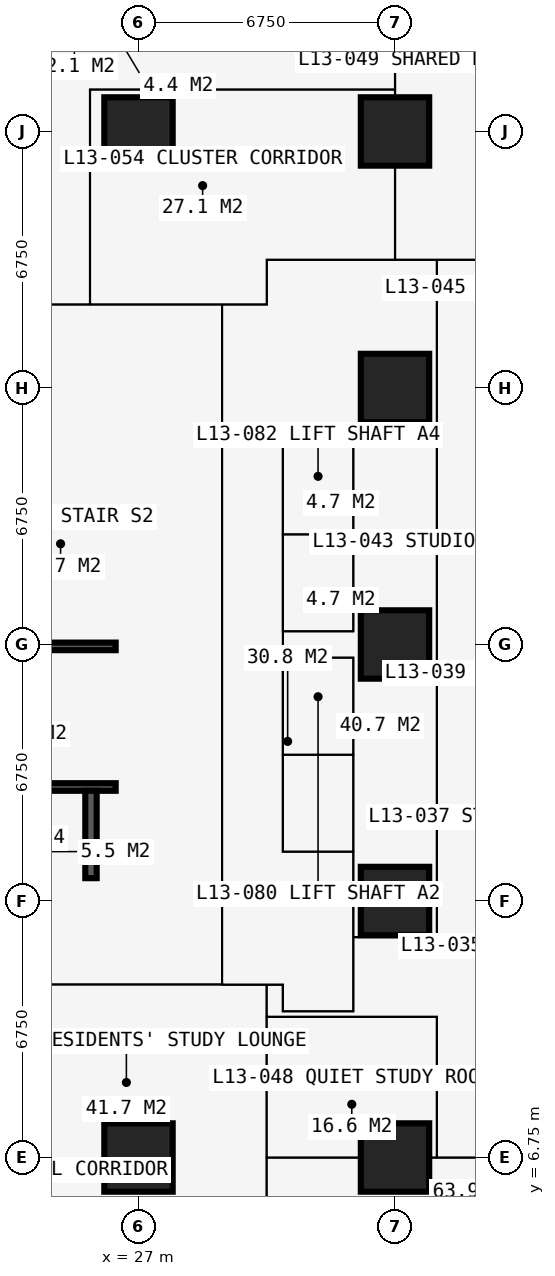
"""IFC4 building model, lengths in metres.
Left out: names, types, materials, properties, quantities, classifications, styles, units other than length and angle.
Written with IfcOpenShell. Run it as: python <this file> out.ifc"""

import sys

from ifc_helpers import new_model, si_unit, direction, frame, frame_2d, origin, origin_2d, place, context, subcontext, project, spatial, rectangle, extrude, element, fill, save


model = new_model("IFC4")
c1 = context("Model", 3, precision=1e-05, world=origin(), true_north=direction((0.0, 1.0)))
c2 = subcontext(c1, "Body", "Model", "MODEL_VIEW")
j1 = project(units=[si_unit("LENGTHUNIT", "METRE"), si_unit("PLANEANGLEUNIT", "RADIAN")], contexts=[c1])
p1 = place(None, origin())
s1 = spatial("IfcSite", under=j1, at=p1, CompositionType="ELEMENT")
p2 = place(p1, origin())
s2 = spatial("IfcBuilding", under=s1, at=p2, CompositionType="ELEMENT")
p3 = place(p2, frame((0.0, 0.0, 50.4)))
s3 = spatial("IfcBuildingStorey", under=s2, at=p3, CompositionType="ELEMENT", Elevation=50.4)
for number, where, z_axis, x_axis in (
    (1, (27.0, 6.75, 0.0), (0.0, 0.0, 1.0), (1.0, 0.0, 0.0)),
    (2, (27.0, 33.75, 0.0), (0.0, 0.0, 1.0), (1.0, 0.0, 0.0)),
    (3, (33.75, 6.75, 0.0), (0.0, 0.0, 1.0), (1.0, 0.0, 0.0)),
    (4, (33.75, 13.5, 0.0), (0.0, 0.0, 1.0), (1.0, 0.0, 0.0)),
    (5, (33.75, 20.25, 0.0), (0.0, 0.0, 1.0), (1.0, 0.0, 0.0)),
    (6, (33.75, 27.0, 0.0), (0.0, 0.0, 1.0), (1.0, 0.0, 0.0)),
    (7, (33.75, 33.75, 0.0), (0.0, 0.0, 1.0), (1.0, 0.0, 0.0)),
):
    element("IfcColumn", number, at=place(p3, frame(where, z_axis=z_axis, x_axis=x_axis)), inside=s3, PredefinedType="COLUMN", context=c2, shape_type="SweptSolid", body=[
        extrude(rectangle(XDim=1.8, YDim=1.8, at=origin_2d()), origin(), (0.0, 0.0, 1.0), 3.6),
    ])
p4 = place(p3, frame((12.9, 13.5, 0.0), z_axis=(0.0, 0.0, 1.0), x_axis=(1.0, 0.0, 0.0)))
e8 = element("IfcWall", 8, at=p4, inside=s3, PredefinedType="SHEAR", context=c2, shape_type="SweptSolid", body=[
    extrude(rectangle(XDim=14.7, YDim=1.2, at=frame_2d((7.35, 0.0))), origin(), (0.0, 0.0, 1.0), 3.6),
])
p5 = place(p3, frame((27.0, 14.1, 0.0), z_axis=(0.0, 0.0, 1.0), x_axis=(0.0, 1.0, 0.0)))
e9 = element("IfcWall", 9, at=p5, inside=s3, PredefinedType="SHEAR", context=c2, shape_type="SweptSolid", body=[
    extrude(rectangle(XDim=12.3, YDim=1.2, at=frame_2d((6.15, 0.0))), origin(), (0.0, 0.0, 1.0), 3.6),
])
p6 = place(p5, frame((3.65, 0.0, 0.0)))
e10 = element("IfcOpeningElement", 10, at=p6, cuts=e9, PredefinedType="OPENING", context=c2, shape_type="SweptSolid", body=[
    extrude(rectangle(XDim=1.2, YDim=2.2, at=frame_2d((0.6, 1.1))), frame((0.0, 0.61, 0.0), z_axis=(0.0, -1.0, 0.0), x_axis=(1.0, 0.0, 0.0)), (0.0, 0.0, 1.0), 1.22),
])
p7 = place(p3, frame((27.6, 27.0, 0.0), z_axis=(0.0, 0.0, 1.0), x_axis=(-1.0, 0.0, 0.0)))
e11 = element("IfcWall", 11, at=p7, inside=s3, PredefinedType="SHEAR", context=c2, shape_type="SweptSolid", body=[
    extrude(rectangle(XDim=14.7, YDim=1.2, at=frame_2d((7.35, 0.0))), origin(), (0.0, 0.0, 1.0), 3.6),
])
p8 = place(p7, frame((5.225, 0.0, 0.0)))
e12 = element("IfcOpeningElement", 12, at=p8, cuts=e11, PredefinedType="OPENING", context=c2, shape_type="SweptSolid", body=[
    extrude(rectangle(XDim=0.9, YDim=2.2, at=frame_2d((0.45, 1.1))), frame((0.0, 0.61, 0.0), z_axis=(0.0, -1.0, 0.0), x_axis=(1.0, 0.0, 0.0)), (0.0, 0.0, 1.0), 1.22),
])
p9 = place(p7, frame((8.2, 0.0, 0.0)))
e13 = element("IfcOpeningElement", 13, at=p9, cuts=e11, PredefinedType="OPENING", context=c2, shape_type="SweptSolid", body=[
    extrude(rectangle(XDim=1.0, YDim=2.2, at=frame_2d((0.5, 1.1))), frame((0.0, 0.61, 0.0), z_axis=(0.0, -1.0, 0.0), x_axis=(1.0, 0.0, 0.0)), (0.0, 0.0, 1.0), 1.22),
])
p10 = place(p3, frame((14.1, 16.5, 0.0), z_axis=(0.0, 0.0, 1.0), x_axis=(1.0, 0.0, 0.0)))
e14 = element("IfcWall", 14, at=p10, inside=s3, PredefinedType="SHEAR", context=c2, shape_type="SweptSolid", body=[
    extrude(rectangle(XDim=12.3, YDim=0.2, at=frame_2d((6.15, 0.0))), origin(), (0.0, 0.0, 1.0), 3.6),
])
p11 = place(p10, frame((0.9, 0.0, 0.0)))
e15 = element("IfcOpeningElement", 15, at=p11, cuts=e14, PredefinedType="OPENING", context=c2, shape_type="SweptSolid", body=[
    extrude(rectangle(XDim=1.1, YDim=2.2, at=frame_2d((0.55, 1.1))), frame((0.0, 0.11, 0.0), z_axis=(0.0, -1.0, 0.0), x_axis=(1.0, 0.0, 0.0)), (0.0, 0.0, 1.0), 0.22),
])
p12 = place(p10, frame((9.5, 0.0, 0.0)))
e16 = element("IfcOpeningElement", 16, at=p12, cuts=e14, PredefinedType="OPENING", context=c2, shape_type="SweptSolid", body=[
    extrude(rectangle(XDim=1.1, YDim=2.2, at=frame_2d((0.55, 1.1))), frame((0.0, 0.11, 0.0), z_axis=(0.0, -1.0, 0.0), x_axis=(1.0, 0.0, 0.0)), (0.0, 0.0, 1.0), 0.22),
])
p13 = place(p3, frame((14.1, 20.2, 0.0), z_axis=(0.0, 0.0, 1.0), x_axis=(1.0, 0.0, 0.0)))
e17 = element("IfcWall", 17, at=p13, inside=s3, PredefinedType="SHEAR", context=c2, shape_type="SweptSolid", body=[
    extrude(rectangle(XDim=12.3, YDim=0.2, at=frame_2d((6.15, 0.0))), origin(), (0.0, 0.0, 1.0), 3.6),
])
p14 = place(p13, frame((0.35, 0.0, 0.0)))
e18 = element("IfcOpeningElement", 18, at=p14, cuts=e17, PredefinedType="OPENING", context=c2, shape_type="SweptSolid", body=[
    extrude(rectangle(XDim=1.1, YDim=2.2, at=frame_2d((0.55, 1.1))), frame((0.0, 0.11, 0.0), z_axis=(0.0, -1.0, 0.0), x_axis=(1.0, 0.0, 0.0)), (0.0, 0.0, 1.0), 0.22),
])
p15 = place(p13, frame((9.75, 0.0, 0.0)))
e19 = element("IfcOpeningElement", 19, at=p15, cuts=e17, PredefinedType="OPENING", context=c2, shape_type="SweptSolid", body=[
    extrude(rectangle(XDim=1.1, YDim=2.2, at=frame_2d((0.55, 1.1))), frame((0.0, 0.11, 0.0), z_axis=(0.0, -1.0, 0.0), x_axis=(1.0, 0.0, 0.0)), (0.0, 0.0, 1.0), 0.22),
])
p16 = place(p3, frame((25.75, 14.1, 0.0), z_axis=(0.0, 0.0, 1.0), x_axis=(0.0, 1.0, 0.0)))
e20 = element("IfcWall", 20, at=p16, inside=s3, PredefinedType="SHEAR", context=c2, shape_type="SweptSolid", body=[
    extrude(rectangle(XDim=2.3, YDim=0.3, at=frame_2d((1.15, 0.0))), origin(), (0.0, 0.0, 1.0), 3.6),
])
p17 = place(p3, frame((10.125, 11.3, 0.0), z_axis=(0.0, 0.0, 1.0), x_axis=(1.0, 0.0, 0.0)))
e21 = element("IfcWall", 21, at=p17, inside=s3, PredefinedType="PARTITIONING", context=c2, shape_type="SweptSolid", body=[
    extrude(rectangle(XDim=20.675, YDim=0.15, at=frame_2d((10.337, 0.0))), origin(), (0.0, 0.0, 1.0), 3.375),
])
p18 = place(p17, frame((1.775, 0.0, 0.0)))
e22 = element("IfcOpeningElement", 22, at=p18, cuts=e21, PredefinedType="OPENING", context=c2, shape_type="SweptSolid", body=[
    extrude(rectangle(XDim=1.0, YDim=2.2, at=frame_2d((0.5, 1.1))), frame((0.0, 0.085, 0.0), z_axis=(0.0, -1.0, 0.0), x_axis=(1.0, 0.0, 0.0)), (0.0, 0.0, 1.0), 0.17),
])
p19 = place(p17, frame((11.312, 0.0, 0.0)))
e23 = element("IfcOpeningElement", 23, at=p19, cuts=e21, PredefinedType="OPENING", context=c2, shape_type="SweptSolid", body=[
    extrude(rectangle(XDim=1.0, YDim=2.2, at=frame_2d((0.5, 1.1))), frame((0.0, 0.085, 0.0), z_axis=(0.0, -1.0, 0.0), x_axis=(1.0, 0.0, 0.0)), (0.0, 0.0, 1.0), 0.17),
])
p20 = place(p3, frame((11.3, 29.2, 0.0), z_axis=(0.0, 0.0, 1.0), x_axis=(1.0, 0.0, 0.0)))
e24 = element("IfcWall", 24, at=p20, inside=s3, PredefinedType="PARTITIONING", context=c2, shape_type="SweptSolid", body=[
    extrude(rectangle(XDim=19.075, YDim=0.15, at=frame_2d((9.538, 0.0))), origin(), (0.0, 0.0, 1.0), 3.375),
])
p21 = place(p20, frame((12.875, 0.0, 0.0)))
e25 = element("IfcOpeningElement", 25, at=p21, cuts=e24, PredefinedType="OPENING", context=c2, shape_type="SweptSolid", body=[
    extrude(rectangle(XDim=1.0, YDim=2.2, at=frame_2d((0.5, 1.1))), frame((0.0, 0.085, 0.0), z_axis=(0.0, -1.0, 0.0), x_axis=(1.0, 0.0, 0.0)), (0.0, 0.0, 1.0), 0.17),
])
p22 = place(p20, frame((10.438, 0.0, 0.0)))
e26 = element("IfcOpeningElement", 26, at=p22, cuts=e24, PredefinedType="OPENING", context=c2, shape_type="SweptSolid", body=[
    extrude(rectangle(XDim=1.0, YDim=2.2, at=frame_2d((0.5, 1.1))), frame((0.0, 0.085, 0.0), z_axis=(0.0, -1.0, 0.0), x_axis=(1.0, 0.0, 0.0)), (0.0, 0.0, 1.0), 0.17),
])
p23 = place(p20, frame((15.675, 0.0, 0.0)))
e27 = element("IfcOpeningElement", 27, at=p23, cuts=e24, PredefinedType="OPENING", context=c2, shape_type="SweptSolid", body=[
    extrude(rectangle(XDim=0.95, YDim=2.2, at=frame_2d((0.475, 1.1))), frame((0.0, 0.085, 0.0), z_axis=(0.0, -1.0, 0.0), x_axis=(1.0, 0.0, 0.0)), (0.0, 0.0, 1.0), 0.17),
])
p24 = place(p3, frame((25.725, 29.2, 0.0), z_axis=(0.0, 0.0, 1.0), x_axis=(0.0, 1.0, 0.0)))
e28 = element("IfcWall", 28, at=p24, inside=s3, PredefinedType="PARTITIONING", context=c2, shape_type="SweptSolid", body=[
    extrude(rectangle(XDim=5.65, YDim=0.15, at=frame_2d((2.825, 0.0))), origin(), (0.0, 0.0, 1.0), 3.375),
])
p25 = place(p3, frame((25.725, 34.85, 0.0), z_axis=(0.0, 0.0, 1.0), x_axis=(1.0, 0.0, 0.0)))
e29 = element("IfcWall", 29, at=p25, inside=s3, PredefinedType="PARTITIONING", context=c2, shape_type="SweptSolid", body=[
    extrude(rectangle(XDim=8.025, YDim=0.15, at=frame_2d((4.012, 0.0))), origin(), (0.0, 0.0, 1.0), 3.375),
])
p26 = place(p3, frame((29.2, 11.3, 0.0), z_axis=(0.0, 0.0, 1.0), x_axis=(0.0, 1.0, 0.0)))
e30 = element("IfcWall", 30, at=p26, inside=s3, PredefinedType="PARTITIONING", context=c2, shape_type="SweptSolid", body=[
    extrude(rectangle(XDim=17.9, YDim=0.2, at=frame_2d((8.95, 0.0))), origin(), (0.0, 0.0, 1.0), 3.375),
])
p27 = place(p26, frame((8.35, 0.0, 0.0)))
e31 = element("IfcOpeningElement", 31, at=p27, cuts=e30, PredefinedType="OPENING", context=c2, shape_type="SweptSolid", body=[
    extrude(rectangle(XDim=1.2, YDim=2.2, at=frame_2d((0.6, 1.1))), frame((0.0, 0.11, 0.0), z_axis=(0.0, -1.0, 0.0), x_axis=(1.0, 0.0, 0.0)), (0.0, 0.0, 1.0), 0.22),
])
p28 = place(p3, frame((29.2, 25.7, 0.0), z_axis=(0.0, 0.0, 1.0), x_axis=(1.0, 0.0, 0.0)))
e32 = element("IfcWall", 32, at=p28, inside=s3, PredefinedType="SHEAR", context=c2, shape_type="SweptSolid", body=[
    extrude(rectangle(XDim=3.45, YDim=0.1, at=frame_2d((1.725, 0.0))), origin(), (0.0, 0.0, 1.0), 3.375),
])
p29 = place(p3, frame((30.375, -0.734, 0.0), z_axis=(0.0, 0.0, 1.0), x_axis=(0.0, 1.0, 0.0)))
e33 = element("IfcWall", 33, at=p29, inside=s3, PredefinedType="PARTITIONING", context=c2, shape_type="SweptSolid", body=[
    extrude(rectangle(XDim=12.034, YDim=0.15, at=frame_2d((6.017, 0.0))), origin(), (0.0, 0.0, 1.0), 3.375),
])
p30 = place(p29, frame((5.134, 0.0, 0.0)))
e34 = element("IfcOpeningElement", 34, at=p30, cuts=e33, PredefinedType="OPENING", context=c2, shape_type="SweptSolid", body=[
    extrude(rectangle(XDim=1.0, YDim=2.2, at=frame_2d((0.5, 1.1))), frame((0.0, 0.085, 0.0), z_axis=(0.0, -1.0, 0.0), x_axis=(1.0, 0.0, 0.0)), (0.0, 0.0, 1.0), 0.17),
])
p31 = place(p3, frame((30.375, 6.75, 0.0), z_axis=(0.0, 0.0, 1.0), x_axis=(1.0, 0.0, 0.0)))
e35 = element("IfcWall", 35, at=p31, inside=s3, PredefinedType="PARTITIONING", context=c2, shape_type="SweptSolid", body=[
    extrude(rectangle(XDim=5.975, YDim=0.15, at=frame_2d((2.988, 0.0))), origin(), (0.0, 0.0, 1.0), 2.877),
])
p32 = place(p3, frame((30.375, 10.45, 0.0), z_axis=(0.0, 0.0, 1.0), x_axis=(1.0, 0.0, 0.0)))
e36 = element("IfcWall", 36, at=p32, inside=s3, PredefinedType="PARTITIONING", context=c2, shape_type="SweptSolid", body=[
    extrude(rectangle(XDim=4.475, YDim=0.15, at=frame_2d((2.238, 0.0))), origin(), (0.0, 0.0, 1.0), 3.375),
])
p33 = place(p32, frame((2.35, 0.0, 0.0)))
e37 = element("IfcOpeningElement", 37, at=p33, cuts=e36, PredefinedType="OPENING", context=c2, shape_type="SweptSolid", body=[
    extrude(rectangle(XDim=0.95, YDim=2.2, at=frame_2d((0.475, 1.1))), frame((0.0, 0.085, 0.0), z_axis=(0.0, -1.0, 0.0), x_axis=(1.0, 0.0, 0.0)), (0.0, 0.0, 1.0), 0.17),
])
p34 = place(p3, frame((30.375, 29.2, 0.0), z_axis=(0.0, 0.0, 1.0), x_axis=(0.0, 1.0, 0.0)))
e38 = element("IfcWall", 38, at=p34, inside=s3, PredefinedType="PARTITIONING", context=c2, shape_type="SweptSolid", body=[
    extrude(rectangle(XDim=1.175, YDim=0.15, at=frame_2d((0.587, 0.0))), origin(), (0.0, 0.0, 1.0), 3.375),
])
p35 = place(p3, frame((30.375, 30.375, 0.0), z_axis=(0.0, 0.0, 1.0), x_axis=(1.0, 0.0, 0.0)))
e39 = element("IfcWall", 39, at=p35, inside=s3, PredefinedType="PARTITIONING", context=c2, shape_type="SweptSolid", body=[
    extrude(rectangle(XDim=10.859, YDim=0.15, at=frame_2d((5.429, 0.0))), origin(), (0.0, 0.0, 1.0), 3.375),
])
p36 = place(p3, frame((30.8, 10.6, 0.0), z_axis=(0.0, 0.0, 1.0), x_axis=(0.0, 1.0, 0.0)))
e40 = element("IfcWall", 40, at=p36, inside=s3, PredefinedType="PARTITIONING", context=c2, shape_type="SweptSolid", body=[
    extrude(rectangle(XDim=0.7, YDim=0.15, at=frame_2d((0.35, 0.0))), origin(), (0.0, 0.0, 1.0), 3.375),
])
p37 = place(p3, frame((30.8, 10.6, 0.0), z_axis=(0.0, 0.0, 1.0), x_axis=(1.0, 0.0, 0.0)))
e41 = element("IfcWall", 41, at=p37, inside=s3, PredefinedType="PARTITIONING", context=c2, shape_type="SweptSolid", body=[
    extrude(rectangle(XDim=1.85, YDim=0.15, at=frame_2d((0.925, 0.0))), origin(), (0.0, 0.0, 1.0), 3.375),
])
p38 = place(p3, frame((30.8, 14.8, 0.0), z_axis=(0.0, 0.0, 1.0), x_axis=(0.0, 1.0, 0.0)))
e42 = element("IfcWall", 42, at=p38, inside=s3, PredefinedType="PARTITIONING", context=c2, shape_type="SweptSolid", body=[
    extrude(rectangle(XDim=10.9, YDim=0.15, at=frame_2d((5.45, 0.0))), origin(), (0.0, 0.0, 1.0), 3.375),
])
p39 = place(p38, frame((0.75, 0.0, 0.0)))
e43 = element("IfcOpeningElement", 43, at=p39, cuts=e42, PredefinedType="OPENING", context=c2, shape_type="SweptSolid", body=[
    extrude(rectangle(XDim=1.1, YDim=2.2, at=frame_2d((0.55, 1.1))), frame((0.0, 0.085, 0.0), z_axis=(0.0, -1.0, 0.0), x_axis=(1.0, 0.0, 0.0)), (0.0, 0.0, 1.0), 0.17),
])
p40 = place(p38, frame((3.25, 0.0, 0.0)))
e44 = element("IfcOpeningElement", 44, at=p40, cuts=e42, PredefinedType="OPENING", context=c2, shape_type="SweptSolid", body=[
    extrude(rectangle(XDim=1.1, YDim=2.2, at=frame_2d((0.55, 1.1))), frame((0.0, 0.085, 0.0), z_axis=(0.0, -1.0, 0.0), x_axis=(1.0, 0.0, 0.0)), (0.0, 0.0, 1.0), 0.17),
])
p41 = place(p38, frame((6.5, 0.0, 0.0)))
e45 = element("IfcOpeningElement", 45, at=p41, cuts=e42, PredefinedType="OPENING", context=c2, shape_type="SweptSolid", body=[
    extrude(rectangle(XDim=1.1, YDim=2.2, at=frame_2d((0.55, 1.1))), frame((0.0, 0.085, 0.0), z_axis=(0.0, -1.0, 0.0), x_axis=(1.0, 0.0, 0.0)), (0.0, 0.0, 1.0), 0.17),
])
p42 = place(p38, frame((9.05, 0.0, 0.0)))
e46 = element("IfcOpeningElement", 46, at=p42, cuts=e42, PredefinedType="OPENING", context=c2, shape_type="SweptSolid", body=[
    extrude(rectangle(XDim=1.1, YDim=2.2, at=frame_2d((0.55, 1.1))), frame((0.0, 0.085, 0.0), z_axis=(0.0, -1.0, 0.0), x_axis=(1.0, 0.0, 0.0)), (0.0, 0.0, 1.0), 0.17),
])
for number, where, z_axis, x_axis in (
    (47, (30.8, 14.8, 0.0), (0.0, 0.0, 1.0), (1.0, 0.0, 0.0)),
    (48, (30.8, 17.35, 0.0), (0.0, 0.0, 1.0), (1.0, 0.0, 0.0)),
    (49, (30.8, 19.9, 0.0), (0.0, 0.0, 1.0), (1.0, 0.0, 0.0)),
    (50, (30.8, 20.6, 0.0), (0.0, 0.0, 1.0), (1.0, 0.0, 0.0)),
    (51, (30.8, 23.15, 0.0), (0.0, 0.0, 1.0), (1.0, 0.0, 0.0)),
):
    element("IfcWall", number, at=place(p3, frame(where, z_axis=z_axis, x_axis=x_axis)), inside=s3, PredefinedType="SHEAR", context=c2, shape_type="SweptSolid", body=[
        extrude(rectangle(XDim=1.85, YDim=0.1, at=frame_2d((0.925, 0.0))), origin(), (0.0, 0.0, 1.0), 3.375),
    ])
p43 = place(p3, frame((32.65, 10.6, 0.0), z_axis=(0.0, 0.0, 1.0), x_axis=(0.0, 1.0, 0.0)))
e52 = element("IfcWall", 52, at=p43, inside=s3, PredefinedType="SHEAR", context=c2, shape_type="SweptSolid", body=[
    extrude(rectangle(XDim=9.3, YDim=0.1, at=frame_2d((4.65, 0.0))), origin(), (0.0, 0.0, 1.0), 3.375),
])
p44 = place(p43, frame((0.5, 0.0, 0.0)))
e53 = element("IfcOpeningElement", 53, at=p44, cuts=e52, PredefinedType="OPENING", context=c2, shape_type="SweptSolid", body=[
    extrude(rectangle(XDim=1.0, YDim=2.2, at=frame_2d((0.5, 1.1))), frame((0.0, 0.06, 0.0), z_axis=(0.0, -1.0, 0.0), x_axis=(1.0, 0.0, 0.0)), (0.0, 0.0, 1.0), 0.12),
])
p45 = place(p3, frame((32.65, 12.55, 0.0), z_axis=(0.0, 0.0, 1.0), x_axis=(1.0, 0.0, 0.0)))
e54 = element("IfcWall", 54, at=p45, inside=s3, PredefinedType="PARTITIONING", context=c2, shape_type="SweptSolid", body=[
    extrude(rectangle(XDim=2.2, YDim=0.15, at=frame_2d((1.1, 0.0))), origin(), (0.0, 0.0, 1.0), 3.375),
])
p46 = place(p3, frame((32.65, 20.6, 0.0), z_axis=(0.0, 0.0, 1.0), x_axis=(0.0, 1.0, 0.0)))
e55 = element("IfcWall", 55, at=p46, inside=s3, PredefinedType="PARTITIONING", context=c2, shape_type="SweptSolid", body=[
    extrude(rectangle(XDim=5.1, YDim=0.15, at=frame_2d((2.55, 0.0))), origin(), (0.0, 0.0, 1.0), 3.375),
])
p47 = place(p3, frame((33.75, 30.375, 0.0), z_axis=(0.0, 0.0, 1.0), x_axis=(0.0, 1.0, 0.0)))
e56 = element("IfcWall", 56, at=p47, inside=s3, PredefinedType="PARTITIONING", context=c2, shape_type="SweptSolid", body=[
    extrude(rectangle(XDim=5.975, YDim=0.15, at=frame_2d((2.988, 0.0))), origin(), (0.0, 0.0, 1.0), 2.877),
])
p48 = place(p3, frame((34.85, 6.75, 0.0), z_axis=(0.0, 0.0, 1.0), x_axis=(0.0, 1.0, 0.0)))
e57 = element("IfcWall", 57, at=p48, inside=s3, PredefinedType="PARTITIONING", context=c2, shape_type="SweptSolid", body=[
    extrude(rectangle(XDim=3.7, YDim=0.15, at=frame_2d((1.85, 0.0))), origin(), (0.0, 0.0, 1.0), 3.375),
])
p49 = place(p3, frame((34.85, 12.55, 0.0), z_axis=(0.0, 0.0, 1.0), x_axis=(0.0, 1.0, 0.0)))
e58 = element("IfcWall", 58, at=p49, inside=s3, PredefinedType="PARTITIONING", context=c2, shape_type="SweptSolid", body=[
    extrude(rectangle(XDim=17.825, YDim=0.15, at=frame_2d((8.913, 0.0))), origin(), (0.0, 0.0, 1.0), 3.375),
])
p50 = place(p49, frame((8.6, 0.0, 0.0)))
e59 = element("IfcOpeningElement", 59, at=p50, cuts=e58, PredefinedType="OPENING", context=c2, shape_type="SweptSolid", body=[
    extrude(rectangle(XDim=0.95, YDim=2.2, at=frame_2d((0.475, 1.1))), frame((0.0, 0.085, 0.0), z_axis=(0.0, -1.0, 0.0), x_axis=(1.0, 0.0, 0.0)), (0.0, 0.0, 1.0), 0.17),
])
p51 = place(p6, origin())
e60 = element("IfcDoor", 60, at=p51, inside=s3, OperationType="DOUBLE_DOOR_SINGLE_SWING", PredefinedType="DOOR", context=c2, shape_type="SweptSolid", body=[
    extrude(rectangle(XDim=1.2, YDim=2.2, at=frame_2d((0.6, 1.1))), frame((0.0, 0.025, 0.0), z_axis=(0.0, -1.0, 0.0), x_axis=(1.0, 0.0, 0.0)), (0.0, 0.0, 1.0), 0.05),
])
fill(e10, e60)
p52 = place(p15, origin())
e61 = element("IfcDoor", 61, at=p52, inside=s3, OperationType="SINGLE_SWING_LEFT", PredefinedType="DOOR", context=c2, shape_type="SweptSolid", body=[
    extrude(rectangle(XDim=1.1, YDim=2.2, at=frame_2d((0.55, 1.1))), frame((0.0, 0.025, 0.0), z_axis=(0.0, -1.0, 0.0), x_axis=(1.0, 0.0, 0.0)), (0.0, 0.0, 1.0), 0.05),
])
fill(e19, e61)
p53 = place(p44, origin())
e62 = element("IfcDoor", 62, at=p53, inside=s3, OperationType="SINGLE_SWING_LEFT", PredefinedType="DOOR", context=c2, shape_type="SweptSolid", body=[
    extrude(rectangle(XDim=1.0, YDim=2.2, at=frame_2d((0.5, 1.1))), frame((0.0, 0.025, 0.0), z_axis=(0.0, -1.0, 0.0), x_axis=(1.0, 0.0, 0.0)), (0.0, 0.0, 1.0), 0.05),
])
fill(e53, e62)
p54 = place(p50, origin())
e63 = element("IfcDoor", 63, at=p54, inside=s3, OperationType="SINGLE_SWING_LEFT", PredefinedType="DOOR", context=c2, shape_type="SweptSolid", body=[
    extrude(rectangle(XDim=0.95, YDim=2.2, at=frame_2d((0.475, 1.1))), frame((0.0, 0.025, 0.0), z_axis=(0.0, -1.0, 0.0), x_axis=(1.0, 0.0, 0.0)), (0.0, 0.0, 1.0), 0.05),
])
fill(e59, e63)
p55 = place(p33, origin())
e64 = element("IfcDoor", 64, at=p55, inside=s3, OperationType="SINGLE_SWING_LEFT", PredefinedType="DOOR", context=c2, shape_type="SweptSolid", body=[
    extrude(rectangle(XDim=0.95, YDim=2.2, at=frame_2d((0.475, 1.1))), frame((0.0, 0.025, 0.0), z_axis=(0.0, -1.0, 0.0), x_axis=(1.0, 0.0, 0.0)), (0.0, 0.0, 1.0), 0.05),
])
fill(e37, e64)
p56 = place(p21, origin())
e65 = element("IfcDoor", 65, at=p56, inside=s3, OperationType="SINGLE_SWING_LEFT", PredefinedType="DOOR", context=c2, shape_type="SweptSolid", body=[
    extrude(rectangle(XDim=1.0, YDim=2.2, at=frame_2d((0.5, 1.1))), frame((0.0, 0.025, 0.0), z_axis=(0.0, -1.0, 0.0), x_axis=(1.0, 0.0, 0.0)), (0.0, 0.0, 1.0), 0.05),
])
fill(e25, e65)
p57 = place(p23, origin())
e66 = element("IfcDoor", 66, at=p57, inside=s3, OperationType="SINGLE_SWING_LEFT", PredefinedType="DOOR", context=c2, shape_type="SweptSolid", body=[
    extrude(rectangle(XDim=0.95, YDim=2.2, at=frame_2d((0.475, 1.1))), frame((0.0, 0.025, 0.0), z_axis=(0.0, -1.0, 0.0), x_axis=(1.0, 0.0, 0.0)), (0.0, 0.0, 1.0), 0.05),
])
fill(e27, e66)
p58 = place(p39, origin())
e67 = element("IfcDoor", 67, at=p58, inside=s3, OperationType="DOUBLE_DOOR_SLIDING", PredefinedType="DOOR", context=c2, shape_type="SweptSolid", body=[
    extrude(rectangle(XDim=1.1, YDim=2.2, at=frame_2d((0.55, 1.1))), frame((0.0, 0.025, 0.0), z_axis=(0.0, -1.0, 0.0), x_axis=(1.0, 0.0, 0.0)), (0.0, 0.0, 1.0), 0.05),
])
fill(e43, e67)
p59 = place(p40, origin())
e68 = element("IfcDoor", 68, at=p59, inside=s3, OperationType="DOUBLE_DOOR_SLIDING", PredefinedType="DOOR", context=c2, shape_type="SweptSolid", body=[
    extrude(rectangle(XDim=1.1, YDim=2.2, at=frame_2d((0.55, 1.1))), frame((0.0, 0.025, 0.0), z_axis=(0.0, -1.0, 0.0), x_axis=(1.0, 0.0, 0.0)), (0.0, 0.0, 1.0), 0.05),
])
fill(e44, e68)
p60 = place(p41, origin())
e69 = element("IfcDoor", 69, at=p60, inside=s3, OperationType="DOUBLE_DOOR_SLIDING", PredefinedType="DOOR", context=c2, shape_type="SweptSolid", body=[
    extrude(rectangle(XDim=1.1, YDim=2.2, at=frame_2d((0.55, 1.1))), frame((0.0, 0.025, 0.0), z_axis=(0.0, -1.0, 0.0), x_axis=(1.0, 0.0, 0.0)), (0.0, 0.0, 1.0), 0.05),
])
fill(e45, e69)
p61 = place(p42, origin())
e70 = element("IfcDoor", 70, at=p61, inside=s3, OperationType="DOUBLE_DOOR_SLIDING", PredefinedType="DOOR", context=c2, shape_type="SweptSolid", body=[
    extrude(rectangle(XDim=1.1, YDim=2.2, at=frame_2d((0.55, 1.1))), frame((0.0, 0.025, 0.0), z_axis=(0.0, -1.0, 0.0), x_axis=(1.0, 0.0, 0.0)), (0.0, 0.0, 1.0), 0.05),
])
fill(e46, e70)
p62 = place(p27, origin())
e71 = element("IfcDoor", 71, at=p62, inside=s3, OperationType="DOUBLE_DOOR_SINGLE_SWING", PredefinedType="DOOR", context=c2, shape_type="SweptSolid", body=[
    extrude(rectangle(XDim=1.2, YDim=2.2, at=frame_2d((0.6, 1.1))), frame((0.0, 0.025, 0.0), z_axis=(0.0, -1.0, 0.0), x_axis=(1.0, 0.0, 0.0)), (0.0, 0.0, 1.0), 0.05),
])
fill(e31, e71)
save(model, sys.argv[1])
